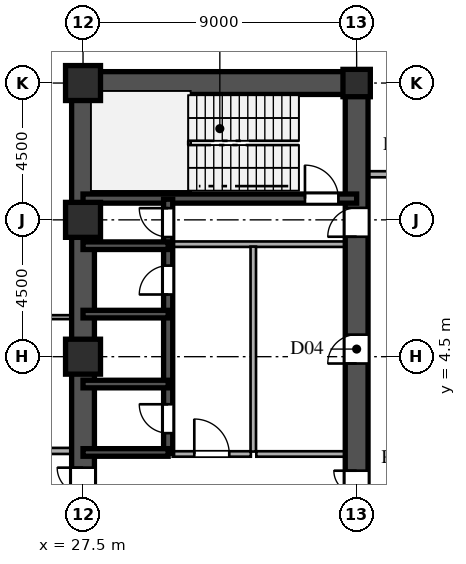
"""IFC4 building model, lengths in metres.
Left out: names, types, materials, properties, quantities, classifications, styles, units other than length and angle.
Written with IfcOpenShell. Run it as: python <this file> out.ifc"""

import sys

from ifc_helpers import new_model, si_unit, direction, frame, frame_2d, origin, origin_2d, place, context, subcontext, project, spatial, rectangle, hollow_rectangle, i_section, extrude, source, transform, mapped, element, fill, save


model = new_model("IFC4")
c1 = context("Model", 3, precision=1e-05, world=origin(), true_north=direction((0.0, 1.0)))
c2 = subcontext(c1, "Body", "Model", "MODEL_VIEW")
j1 = project(units=[si_unit("LENGTHUNIT", "METRE"), si_unit("PLANEANGLEUNIT", "RADIAN")], contexts=[c1])
p1 = place(None, origin())
s1 = spatial("IfcSite", under=j1, at=p1, CompositionType="ELEMENT")
p2 = place(p1, origin())
s2 = spatial("IfcBuilding", under=s1, at=p2, CompositionType="ELEMENT")
p3 = place(p2, frame((0.0, 0.0, -9.6)))
s3 = spatial("IfcBuildingStorey", under=s2, at=p3, CompositionType="ELEMENT", Elevation=-9.6)
m1 = source(origin(), c2, "Body", "SweptSolid", [
    extrude(hollow_rectangle(XDim=1.15, YDim=1.15, WallThickness=0.048, at=origin_2d()), origin(), (0.0, 0.0, 1.0), 4.8),
])
for number, where, z_axis, x_axis in (
    (1, (27.5, 4.5, 0.0), (0.0, 0.0, 1.0), (1.0, 0.0, 0.0)),
    (2, (27.5, 9.0, 0.0), (0.0, 0.0, 1.0), (1.0, 0.0, 0.0)),
    (3, (27.5, 13.5, 0.0), (0.0, 0.0, 1.0), (1.0, 0.0, 0.0)),
):
    element("IfcColumn", number, at=place(p3, frame(where, z_axis=z_axis, x_axis=x_axis)), inside=s3, PredefinedType="COLUMN", context=c2, shape_type="MappedRepresentation", body=[
        mapped(m1, transform((0.0, 0.0, 0.0), scale=1.0)),
    ])
m2 = source(origin(), c2, "Body", "SweptSolid", [
    extrude(i_section(OverallWidth=0.9, OverallDepth=0.9, WebThickness=0.036, FlangeThickness=0.055, at=origin_2d()), origin(), (0.0, 0.0, 1.0), 4.8),
])
p4 = place(p3, frame((36.5, 13.5, 0.0), z_axis=(0.0, 0.0, 1.0), x_axis=(1.0, 0.0, 0.0)))
e4 = element("IfcColumn", 4, at=p4, inside=s3, PredefinedType="COLUMN", context=c2, shape_type="MappedRepresentation", body=[
    mapped(m2, transform((0.0, 0.0, 0.0), scale=1.0)),
])
p5 = place(p3, frame((27.5, 1.3, 0.0), z_axis=(0.0, 0.0, 1.0), x_axis=(0.0, 1.0, 0.0)))
e5 = element("IfcWall", 5, at=p5, inside=s3, PredefinedType="SHEAR", context=c2, shape_type="SweptSolid", body=[
    extrude(rectangle(XDim=12.2, YDim=0.75, at=frame_2d((6.1, 0.0))), origin(), (0.0, 0.0, 1.0), 4.5),
])
p6 = place(p3, frame((27.5, -1.3, 0.0), z_axis=(0.0, 0.0, 1.0), x_axis=(0.0, 1.0, 0.0)))
e6 = element("IfcWall", 6, at=p6, inside=s3, PredefinedType="SHEAR", context=c2, shape_type="SweptSolid", body=[
    extrude(rectangle(XDim=2.6, YDim=0.75, at=frame_2d((1.3, 0.0))), origin(), (0.0, 0.0, 1.0), 4.5),
])
p7 = place(p6, frame((0.45, 0.0, 0.0)))
e7 = element("IfcOpeningElement", 7, at=p7, cuts=e6, PredefinedType="OPENING", context=c2, shape_type="SweptSolid", body=[
    extrude(rectangle(XDim=1.7, YDim=2.35, at=frame_2d((0.85, 1.175))), frame((0.0, 0.385, 0.0), z_axis=(0.0, -1.0, 0.0), x_axis=(1.0, 0.0, 0.0)), (0.0, 0.0, 1.0), 0.77),
])
p8 = place(p3, frame((27.5, 13.5, 0.0), z_axis=(0.0, 0.0, 1.0), x_axis=(1.0, 0.0, 0.0)))
e8 = element("IfcWall", 8, at=p8, inside=s3, PredefinedType="SHEAR", context=c2, shape_type="SweptSolid", body=[
    extrude(rectangle(XDim=9.0, YDim=0.75, at=frame_2d((4.5, 0.0))), origin(), (0.0, 0.0, 1.0), 4.5),
])
p9 = place(p3, frame((36.5, -1.3, 0.0), z_axis=(0.0, 0.0, 1.0), x_axis=(0.0, 1.0, 0.0)))
e9 = element("IfcWall", 9, at=p9, inside=s3, PredefinedType="SHEAR", context=c2, shape_type="SweptSolid", body=[
    extrude(rectangle(XDim=2.6, YDim=0.75, at=frame_2d((1.3, 0.0))), origin(), (0.0, 0.0, 1.0), 4.5),
])
p10 = place(p9, frame((0.55, 0.0, 0.0)))
e10 = element("IfcOpeningElement", 10, at=p10, cuts=e9, PredefinedType="OPENING", context=c2, shape_type="SweptSolid", body=[
    extrude(rectangle(XDim=1.5, YDim=2.3, at=frame_2d((0.75, 1.15))), frame((0.0, 0.385, 0.0), z_axis=(0.0, -1.0, 0.0), x_axis=(1.0, 0.0, 0.0)), (0.0, 0.0, 1.0), 0.77),
])
p11 = place(p3, frame((36.5, 8.2, 0.0), z_axis=(0.0, 0.0, 1.0), x_axis=(0.0, 1.0, 0.0)))
e11 = element("IfcWall", 11, at=p11, inside=s3, PredefinedType="SHEAR", context=c2, shape_type="SweptSolid", body=[
    extrude(rectangle(XDim=5.45, YDim=0.75, at=frame_2d((2.725, 0.0))), origin(), (0.0, 0.0, 1.0), 4.5),
])
p12 = place(p11, frame((0.245, 0.0, 0.0)))
e12 = element("IfcOpeningElement", 12, at=p12, cuts=e11, PredefinedType="OPENING", context=c2, shape_type="SweptSolid", body=[
    extrude(rectangle(XDim=0.95, YDim=2.15, at=frame_2d((0.475, 1.075))), frame((0.0, 0.385, 0.0), z_axis=(0.0, -1.0, 0.0), x_axis=(1.0, 0.0, 0.0)), (0.0, 0.0, 1.0), 0.77),
])
p13 = place(p3, frame((36.5, 1.3, 0.0), z_axis=(0.0, 0.0, 1.0), x_axis=(0.0, 1.0, 0.0)))
e13 = element("IfcWall", 13, at=p13, inside=s3, PredefinedType="SHEAR", context=c2, shape_type="SweptSolid", body=[
    extrude(rectangle(XDim=6.9, YDim=0.75, at=frame_2d((3.45, 0.0))), origin(), (0.0, 0.0, 1.0), 4.5),
])
p14 = place(p13, frame((2.975, 0.0, 0.0)))
e14 = element("IfcOpeningElement", 14, at=p14, cuts=e13, PredefinedType="OPENING", context=c2, shape_type="SweptSolid", body=[
    extrude(rectangle(XDim=0.95, YDim=2.15, at=frame_2d((0.475, 1.075))), frame((0.0, 0.385, 0.0), z_axis=(0.0, -1.0, 0.0), x_axis=(1.0, 0.0, 0.0)), (0.0, 0.0, 1.0), 0.77),
])
p15 = place(p3, frame((27.5, 9.7, 0.0), z_axis=(0.0, 0.0, 1.0), x_axis=(1.0, 0.0, 0.0)))
e15 = element("IfcWall", 15, at=p15, inside=s3, PredefinedType="SHEAR", context=c2, shape_type="SweptSolid", body=[
    extrude(rectangle(XDim=9.0, YDim=0.3, at=frame_2d((4.5, 0.0))), origin(), (0.0, 0.0, 1.0), 4.5),
])
p16 = place(p15, frame((7.3, 0.0, 0.0)))
e16 = element("IfcOpeningElement", 16, at=p16, cuts=e15, PredefinedType="OPENING", context=c2, shape_type="SweptSolid", body=[
    extrude(rectangle(XDim=1.1, YDim=2.2, at=frame_2d((0.55, 1.1))), frame((0.0, 0.16, 0.0), z_axis=(0.0, -1.0, 0.0), x_axis=(1.0, 0.0, 0.0)), (0.0, 0.0, 1.0), 0.32),
])
for number, where, z_axis, x_axis in (
    (17, (27.5, 1.35, 0.0), (0.0, 0.0, 1.0), (1.0, 0.0, 0.0)),
    (18, (27.5, 3.6, 0.0), (0.0, 0.0, 1.0), (1.0, 0.0, 0.0)),
    (19, (27.5, 5.9, 0.0), (0.0, 0.0, 1.0), (1.0, 0.0, 0.0)),
    (20, (27.5, 8.15, 0.0), (0.0, 0.0, 1.0), (1.0, 0.0, 0.0)),
):
    element("IfcWall", number, at=place(p3, frame(where, z_axis=z_axis, x_axis=x_axis)), inside=s3, PredefinedType="SHEAR", context=c2, shape_type="SweptSolid", body=[
        extrude(rectangle(XDim=2.8, YDim=0.25, at=frame_2d((1.4, 0.0))), origin(), (0.0, 0.0, 1.0), 4.5),
    ])
p17 = place(p3, frame((30.3, 1.32, 0.0), z_axis=(0.0, 0.0, 1.0), x_axis=(0.0, 1.0, 0.0)))
e21 = element("IfcWall", 21, at=p17, inside=s3, PredefinedType="SHEAR", context=c2, shape_type="SweptSolid", body=[
    extrude(rectangle(XDim=2.28, YDim=0.3, at=frame_2d((1.14, 0.0))), origin(), (0.0, 0.0, 1.0), 4.5),
])
p18 = place(p17, frame((0.665, 0.0, 0.0)))
e22 = element("IfcOpeningElement", 22, at=p18, cuts=e21, PredefinedType="OPENING", context=c2, shape_type="SweptSolid", body=[
    extrude(rectangle(XDim=0.95, YDim=2.15, at=frame_2d((0.475, 1.075))), frame((0.0, 0.16, 0.0), z_axis=(0.0, -1.0, 0.0), x_axis=(1.0, 0.0, 0.0)), (0.0, 0.0, 1.0), 0.32),
])
p19 = place(p3, frame((30.3, 3.6, 0.0), z_axis=(0.0, 0.0, 1.0), x_axis=(0.0, 1.0, 0.0)))
e23 = element("IfcWall", 23, at=p19, inside=s3, PredefinedType="SHEAR", context=c2, shape_type="SweptSolid", body=[
    extrude(rectangle(XDim=2.3, YDim=0.3, at=frame_2d((1.15, 0.0))), origin(), (0.0, 0.0, 1.0), 4.5),
])
p20 = place(p3, frame((30.3, 5.9, 0.0), z_axis=(0.0, 0.0, 1.0), x_axis=(0.0, 1.0, 0.0)))
e24 = element("IfcWall", 24, at=p20, inside=s3, PredefinedType="SHEAR", context=c2, shape_type="SweptSolid", body=[
    extrude(rectangle(XDim=2.25, YDim=0.3, at=frame_2d((1.125, 0.0))), origin(), (0.0, 0.0, 1.0), 4.5),
])
p21 = place(p20, frame((0.645, 0.0, 0.0)))
e25 = element("IfcOpeningElement", 25, at=p21, cuts=e24, PredefinedType="OPENING", context=c2, shape_type="SweptSolid", body=[
    extrude(rectangle(XDim=0.95, YDim=2.15, at=frame_2d((0.475, 1.075))), frame((0.0, 0.16, 0.0), z_axis=(0.0, -1.0, 0.0), x_axis=(1.0, 0.0, 0.0)), (0.0, 0.0, 1.0), 0.32),
])
p22 = place(p3, frame((30.3, 8.15, 0.0), z_axis=(0.0, 0.0, 1.0), x_axis=(0.0, 1.0, 0.0)))
e26 = element("IfcWall", 26, at=p22, inside=s3, PredefinedType="SHEAR", context=c2, shape_type="SweptSolid", body=[
    extrude(rectangle(XDim=1.53, YDim=0.3, at=frame_2d((0.765, 0.0))), origin(), (0.0, 0.0, 1.0), 4.5),
])
p23 = place(p22, frame((0.285, 0.0, 0.0)))
e27 = element("IfcOpeningElement", 27, at=p23, cuts=e26, PredefinedType="OPENING", context=c2, shape_type="SweptSolid", body=[
    extrude(rectangle(XDim=0.95, YDim=2.15, at=frame_2d((0.475, 1.075))), frame((0.0, 0.16, 0.0), z_axis=(0.0, -1.0, 0.0), x_axis=(1.0, 0.0, 0.0)), (0.0, 0.0, 1.0), 0.32),
])
p24 = place(p3, frame((30.45, 8.2, 0.0), z_axis=(0.0, 0.0, 1.0), x_axis=(1.0, 0.0, 0.0)))
e28 = element("IfcWall", 28, at=p24, inside=s3, PredefinedType="PARTITIONING", context=c2, shape_type="SweptSolid", body=[
    extrude(rectangle(XDim=5.7, YDim=0.18, at=frame_2d((2.85, 0.0))), origin(), (0.0, 0.0, 1.0), 4.5),
])
p25 = place(p3, frame((33.1, 1.38, 0.0), z_axis=(0.0, 0.0, 1.0), x_axis=(0.0, 1.0, 0.0)))
e29 = element("IfcWall", 29, at=p25, inside=s3, PredefinedType="PARTITIONING", context=c2, shape_type="SweptSolid", body=[
    extrude(rectangle(XDim=6.74, YDim=0.18, at=frame_2d((3.37, 0.0))), origin(), (0.0, 0.0, 1.0), 4.5),
])
p26 = place(p3, frame((30.45, 1.3, 0.0), z_axis=(0.0, 0.0, 1.0), x_axis=(1.0, 0.0, 0.0)))
e30 = element("IfcWall", 30, at=p26, inside=s3, PredefinedType="PARTITIONING", context=c2, shape_type="SweptSolid", body=[
    extrude(rectangle(XDim=2.57, YDim=0.18, at=frame_2d((1.285, 0.0))), origin(), (0.0, 0.0, 1.0), 4.5),
])
p27 = place(p26, frame((0.71, 0.0, 0.0)))
e31 = element("IfcOpeningElement", 31, at=p27, cuts=e30, PredefinedType="OPENING", context=c2, shape_type="SweptSolid", body=[
    extrude(rectangle(XDim=1.15, YDim=2.2, at=frame_2d((0.575, 1.1))), frame((0.0, 0.1, 0.0), z_axis=(0.0, -1.0, 0.0), x_axis=(1.0, 0.0, 0.0)), (0.0, 0.0, 1.0), 0.2),
])
p28 = place(p3, frame((33.2, 1.3, 0.0), z_axis=(0.0, 0.0, 1.0), x_axis=(1.0, 0.0, 0.0)))
e32 = element("IfcWall", 32, at=p28, inside=s3, PredefinedType="PARTITIONING", context=c2, shape_type="SweptSolid", body=[
    extrude(rectangle(XDim=2.95, YDim=0.18, at=frame_2d((1.475, 0.0))), origin(), (0.0, 0.0, 1.0), 4.5),
])
p29 = place(p3, frame((-27.12, 1.4, 0.0), z_axis=(0.0, 0.0, 1.0), x_axis=(1.0, 0.0, 0.0)))
e33 = element("IfcWall", 33, at=p29, inside=s3, PredefinedType="PARTITIONING", context=c2, shape_type="SweptSolid", body=[
    extrude(rectangle(XDim=54.24, YDim=0.2, at=frame_2d((27.12, 0.0))), origin(), (0.0, 0.0, 1.0), 4.5),
])
p30 = place(p29, frame((19.545, 0.0, 0.0)))
e34 = element("IfcOpeningElement", 34, at=p30, cuts=e33, PredefinedType="OPENING", context=c2, shape_type="SweptSolid", body=[
    extrude(rectangle(XDim=1.15, YDim=2.2, at=frame_2d((0.575, 1.1))), frame((0.0, 0.11, 0.0), z_axis=(0.0, -1.0, 0.0), x_axis=(1.0, 0.0, 0.0)), (0.0, 0.0, 1.0), 0.22),
])
p31 = place(p29, frame((46.93, 0.0, 0.0)))
e35 = element("IfcOpeningElement", 35, at=p31, cuts=e33, PredefinedType="OPENING", context=c2, shape_type="SweptSolid", body=[
    extrude(rectangle(XDim=0.88, YDim=2.1, at=frame_2d((0.44, 1.05))), frame((0.0, 0.11, 0.0), z_axis=(0.0, -1.0, 0.0), x_axis=(1.0, 0.0, 0.0)), (0.0, 0.0, 1.0), 0.22),
])
p32 = place(p3, frame((18.085, 5.8, 0.0), z_axis=(0.0, 0.0, 1.0), x_axis=(1.0, 0.0, 0.0)))
e36 = element("IfcWall", 36, at=p32, inside=s3, PredefinedType="PARTITIONING", context=c2, shape_type="SweptSolid", body=[
    extrude(rectangle(XDim=9.035, YDim=0.13, at=frame_2d((4.518, 0.0))), origin(), (0.0, 0.0, 1.0), 4.5),
])
p33 = place(p3, frame((36.88, 10.5, 0.0), z_axis=(0.0, 0.0, 1.0), x_axis=(1.0, 0.0, 0.0)))
e37 = element("IfcWall", 37, at=p33, inside=s3, PredefinedType="PARTITIONING", context=c2, shape_type="SweptSolid", body=[
    extrude(rectangle(XDim=2.035, YDim=0.2, at=frame_2d((1.018, 0.0))), origin(), (0.0, 0.0, 1.0), 4.5),
])
m3 = source(origin(), c2, "Body", "SweptSolid", [
    extrude(rectangle(XDim=1.7, YDim=2.35, at=frame_2d((0.85, 1.175))), frame((0.0, 0.025, 0.0), z_axis=(0.0, -1.0, 0.0), x_axis=(1.0, 0.0, 0.0)), (0.0, 0.0, 1.0), 0.05),
])
p34 = place(p7, origin())
e38 = element("IfcDoor", 38, at=p34, inside=s3, OperationType="DOUBLE_SWING_LEFT", PredefinedType="DOOR", context=c2, shape_type="MappedRepresentation", body=[
    mapped(m3, transform((0.0, 0.0, 0.0), scale=1.0)),
])
fill(e7, e38)
m4 = source(origin(), c2, "Body", "SweptSolid", [
    extrude(rectangle(XDim=1.5, YDim=2.3, at=frame_2d((0.75, 1.15))), frame((0.0, 0.025, 0.0), z_axis=(0.0, -1.0, 0.0), x_axis=(1.0, 0.0, 0.0)), (0.0, 0.0, 1.0), 0.05),
])
p35 = place(p10, origin())
e39 = element("IfcDoor", 39, at=p35, inside=s3, OperationType="DOUBLE_SWING_LEFT", PredefinedType="DOOR", context=c2, shape_type="MappedRepresentation", body=[
    mapped(m4, transform((0.0, 0.0, 0.0), scale=1.0)),
])
fill(e10, e39)
m5 = source(origin(), c2, "Body", "SweptSolid", [
    extrude(rectangle(XDim=0.95, YDim=2.15, at=frame_2d((0.475, 1.075))), frame((0.0, 0.025, 0.0), z_axis=(0.0, -1.0, 0.0), x_axis=(1.0, 0.0, 0.0)), (0.0, 0.0, 1.0), 0.05),
])
p36 = place(p12, origin())
e40 = element("IfcDoor", 40, at=p36, inside=s3, OperationType="SINGLE_SWING_LEFT", PredefinedType="DOOR", context=c2, shape_type="MappedRepresentation", body=[
    mapped(m5, transform((0.0, 0.0, 0.0), scale=1.0)),
])
fill(e12, e40)
p37 = place(p14, origin())
e41 = element("IfcDoor", 41, at=p37, inside=s3, OperationType="SINGLE_SWING_LEFT", PredefinedType="DOOR", context=c2, shape_type="MappedRepresentation", body=[
    mapped(m5, transform((0.0, 0.0, 0.0), scale=1.0)),
])
fill(e14, e41)
m6 = source(origin(), c2, "Body", "SweptSolid", [
    extrude(rectangle(XDim=1.1, YDim=2.2, at=frame_2d((0.55, 1.1))), frame((0.0, 0.025, 0.0), z_axis=(0.0, -1.0, 0.0), x_axis=(1.0, 0.0, 0.0)), (0.0, 0.0, 1.0), 0.05),
])
p38 = place(p16, origin())
e42 = element("IfcDoor", 42, at=p38, inside=s3, OperationType="SINGLE_SWING_LEFT", PredefinedType="DOOR", context=c2, shape_type="MappedRepresentation", body=[
    mapped(m6, transform((0.0, 0.0, 0.0), scale=1.0)),
])
fill(e16, e42)
p39 = place(p18, origin())
e43 = element("IfcDoor", 43, at=p39, inside=s3, OperationType="SINGLE_SWING_RIGHT", PredefinedType="DOOR", context=c2, shape_type="MappedRepresentation", body=[
    mapped(m5, transform((0.0, 0.0, 0.0), scale=1.0)),
])
fill(e22, e43)
p40 = place(p21, origin())
e44 = element("IfcDoor", 44, at=p40, inside=s3, OperationType="SINGLE_SWING_LEFT", PredefinedType="DOOR", context=c2, shape_type="MappedRepresentation", body=[
    mapped(m5, transform((0.0, 0.0, 0.0), scale=1.0)),
])
fill(e25, e44)
p41 = place(p23, origin())
e45 = element("IfcDoor", 45, at=p41, inside=s3, OperationType="SINGLE_SWING_RIGHT", PredefinedType="DOOR", context=c2, shape_type="MappedRepresentation", body=[
    mapped(m5, transform((0.0, 0.0, 0.0), scale=1.0)),
])
fill(e27, e45)
m7 = source(origin(), c2, "Body", "SweptSolid", [
    extrude(rectangle(XDim=1.15, YDim=2.2, at=frame_2d((0.575, 1.1))), frame((0.0, 0.025, 0.0), z_axis=(0.0, -1.0, 0.0), x_axis=(1.0, 0.0, 0.0)), (0.0, 0.0, 1.0), 0.05),
])
p42 = place(p27, origin())
e46 = element("IfcDoor", 46, at=p42, inside=s3, OperationType="SINGLE_SWING_LEFT", PredefinedType="DOOR", context=c2, shape_type="MappedRepresentation", body=[
    mapped(m7, transform((0.0, 0.0, 0.0), scale=1.0)),
])
fill(e31, e46)
save(model, sys.argv[1])
